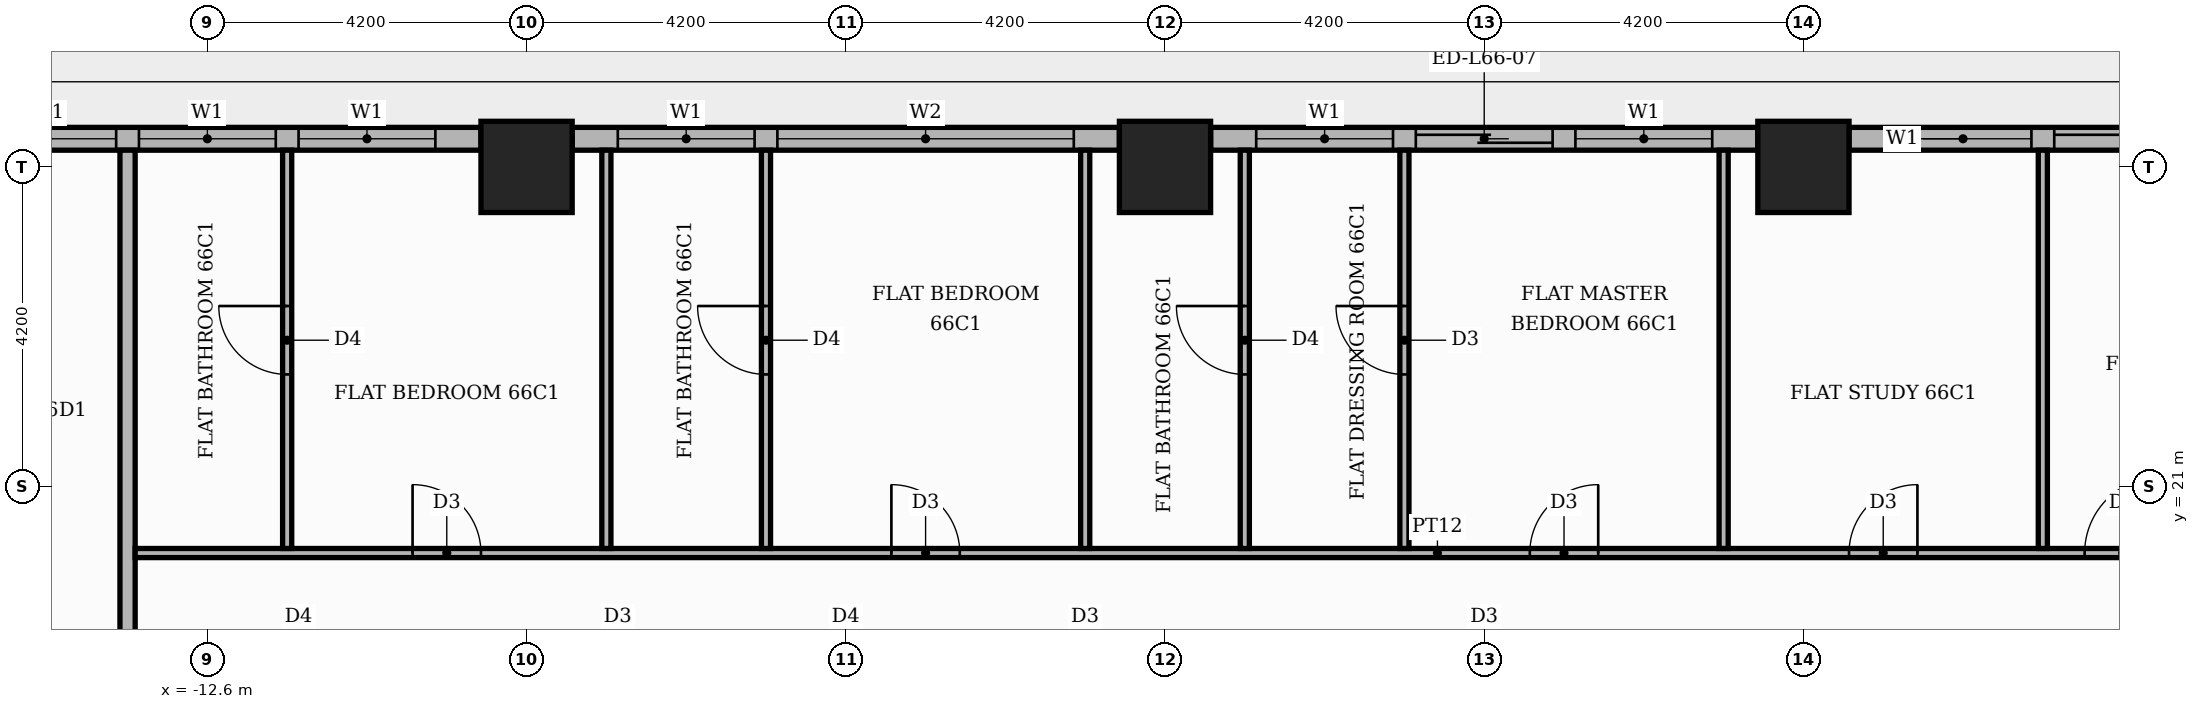
"""IFC4 building model, lengths in metres.
Left out: names, types, materials, properties, quantities, classifications, styles, units other than length and angle.
Written with IfcOpenShell. Run it as: python <this file> out.ifc"""

import sys

from ifc_helpers import new_model, si_unit, direction, frame, frame_2d, origin, origin_2d, place, context, subcontext, project, spatial, rectangle, extrude, element, fill, save


model = new_model("IFC4")
c1 = context("Model", 3, precision=1e-05, world=origin(), true_north=direction((0.0, 1.0)))
c2 = subcontext(c1, "Body", "Model", "MODEL_VIEW")
j1 = project(units=[si_unit("LENGTHUNIT", "METRE"), si_unit("PLANEANGLEUNIT", "RADIAN")], contexts=[c1])
p1 = place(None, origin())
s1 = spatial("IfcSite", under=j1, at=p1, CompositionType="ELEMENT")
p2 = place(p1, origin())
s2 = spatial("IfcBuilding", under=s1, at=p2, CompositionType="ELEMENT")
p3 = place(p2, frame((0.0, 0.0, 275.7)))
s3 = spatial("IfcBuildingStorey", under=s2, at=p3, CompositionType="ELEMENT", Elevation=275.7)
for number, where, z_axis, x_axis in (
    (1, (0.0, 25.2, 0.0), (0.0, 0.0, 1.0), (1.0, 0.0, 0.0)),
    (2, (-8.4, 25.2, 0.0), (0.0, 0.0, 1.0), (1.0, 0.0, 0.0)),
    (3, (8.4, 25.2, 0.0), (0.0, 0.0, 1.0), (1.0, 0.0, 0.0)),
):
    element("IfcColumn", number, at=place(p3, frame(where, z_axis=z_axis, x_axis=x_axis)), inside=s3, PredefinedType="COLUMN", context=c2, shape_type="SweptSolid", body=[
        extrude(rectangle(XDim=1.2, YDim=1.2, at=origin_2d()), origin(), (0.0, 0.0, 1.0), 3.9),
    ])
p4 = place(p3, frame((16.2, 25.57, 0.0), z_axis=(0.0, 0.0, 1.0), x_axis=(-1.0, 0.0, 0.0)))
e4 = element("IfcWall", 4, at=p4, inside=s3, PredefinedType="STANDARD", context=c2, shape_type="SweptSolid", body=[
    extrude(rectangle(XDim=7.2, YDim=0.3, at=frame_2d((3.6, 0.0))), origin(), (0.0, 0.0, 1.0), 3.48),
])
p5 = place(p4, frame((0.6, 0.0, 0.0)))
e5 = element("IfcOpeningElement", 5, at=p5, cuts=e4, PredefinedType="OPENING", context=c2, shape_type="SweptSolid", body=[
    extrude(rectangle(XDim=3.9, YDim=2.4, at=frame_2d((1.95, 1.2))), frame((0.0, 0.16, 0.0), z_axis=(0.0, -1.0, 0.0), x_axis=(1.0, 0.0, 0.0)), (0.0, 0.0, 1.0), 0.32),
])
p6 = place(p4, frame((4.8, 0.0, 0.9)))
e6 = element("IfcOpeningElement", 6, at=p6, cuts=e4, PredefinedType="OPENING", context=c2, shape_type="SweptSolid", body=[
    extrude(rectangle(XDim=1.8, YDim=2.1, at=frame_2d((0.9, 1.05))), frame((0.0, 0.16, 0.0), z_axis=(0.0, -1.0, 0.0), x_axis=(1.0, 0.0, 0.0)), (0.0, 0.0, 1.0), 0.32),
])
p7 = place(p3, frame((7.8, 25.57, 0.0), z_axis=(0.0, 0.0, 1.0), x_axis=(-1.0, 0.0, 0.0)))
e7 = element("IfcWall", 7, at=p7, inside=s3, PredefinedType="STANDARD", context=c2, shape_type="SweptSolid", body=[
    extrude(rectangle(XDim=7.2, YDim=0.3, at=frame_2d((3.6, 0.0))), origin(), (0.0, 0.0, 1.0), 3.48),
])
p8 = place(p7, frame((0.6, 0.0, 0.9)))
e8 = element("IfcOpeningElement", 8, at=p8, cuts=e7, PredefinedType="OPENING", context=c2, shape_type="SweptSolid", body=[
    extrude(rectangle(XDim=1.8, YDim=2.1, at=frame_2d((0.9, 1.05))), frame((0.0, 0.16, 0.0), z_axis=(0.0, -1.0, 0.0), x_axis=(1.0, 0.0, 0.0)), (0.0, 0.0, 1.0), 0.32),
])
p9 = place(p7, frame((2.7, 0.0, 0.0)))
e9 = element("IfcOpeningElement", 9, at=p9, cuts=e7, PredefinedType="OPENING", context=c2, shape_type="SweptSolid", body=[
    extrude(rectangle(XDim=1.8, YDim=2.4, at=frame_2d((0.9, 1.2))), frame((0.0, 0.16, 0.0), z_axis=(0.0, -1.0, 0.0), x_axis=(1.0, 0.0, 0.0)), (0.0, 0.0, 1.0), 0.32),
])
p10 = place(p7, frame((4.8, 0.0, 0.9)))
e10 = element("IfcOpeningElement", 10, at=p10, cuts=e7, PredefinedType="OPENING", context=c2, shape_type="SweptSolid", body=[
    extrude(rectangle(XDim=1.8, YDim=2.1, at=frame_2d((0.9, 1.05))), frame((0.0, 0.16, 0.0), z_axis=(0.0, -1.0, 0.0), x_axis=(1.0, 0.0, 0.0)), (0.0, 0.0, 1.0), 0.32),
])
p11 = place(p3, frame((-0.6, 25.57, 0.0), z_axis=(0.0, 0.0, 1.0), x_axis=(-1.0, 0.0, 0.0)))
e11 = element("IfcWall", 11, at=p11, inside=s3, PredefinedType="STANDARD", context=c2, shape_type="SweptSolid", body=[
    extrude(rectangle(XDim=7.2, YDim=0.3, at=frame_2d((3.6, 0.0))), origin(), (0.0, 0.0, 1.0), 3.48),
])
p12 = place(p11, frame((0.6, 0.0, 0.9)))
e12 = element("IfcOpeningElement", 12, at=p12, cuts=e11, PredefinedType="OPENING", context=c2, shape_type="SweptSolid", body=[
    extrude(rectangle(XDim=3.9, YDim=2.1, at=frame_2d((1.95, 1.05))), frame((0.0, 0.16, 0.0), z_axis=(0.0, -1.0, 0.0), x_axis=(1.0, 0.0, 0.0)), (0.0, 0.0, 1.0), 0.32),
])
p13 = place(p11, frame((4.8, 0.0, 0.9)))
e13 = element("IfcOpeningElement", 13, at=p13, cuts=e11, PredefinedType="OPENING", context=c2, shape_type="SweptSolid", body=[
    extrude(rectangle(XDim=1.8, YDim=2.1, at=frame_2d((0.9, 1.05))), frame((0.0, 0.16, 0.0), z_axis=(0.0, -1.0, 0.0), x_axis=(1.0, 0.0, 0.0)), (0.0, 0.0, 1.0), 0.32),
])
p14 = place(p3, frame((-9.0, 25.57, 0.0), z_axis=(0.0, 0.0, 1.0), x_axis=(-1.0, 0.0, 0.0)))
e14 = element("IfcWall", 14, at=p14, inside=s3, PredefinedType="STANDARD", context=c2, shape_type="SweptSolid", body=[
    extrude(rectangle(XDim=7.2, YDim=0.3, at=frame_2d((3.6, 0.0))), origin(), (0.0, 0.0, 1.0), 3.48),
])
p15 = place(p14, frame((0.6, 0.0, 0.9)))
e15 = element("IfcOpeningElement", 15, at=p15, cuts=e14, PredefinedType="OPENING", context=c2, shape_type="SweptSolid", body=[
    extrude(rectangle(XDim=1.8, YDim=2.1, at=frame_2d((0.9, 1.05))), frame((0.0, 0.16, 0.0), z_axis=(0.0, -1.0, 0.0), x_axis=(1.0, 0.0, 0.0)), (0.0, 0.0, 1.0), 0.32),
])
p16 = place(p14, frame((2.7, 0.0, 0.9)))
e16 = element("IfcOpeningElement", 16, at=p16, cuts=e14, PredefinedType="OPENING", context=c2, shape_type="SweptSolid", body=[
    extrude(rectangle(XDim=1.8, YDim=2.1, at=frame_2d((0.9, 1.05))), frame((0.0, 0.16, 0.0), z_axis=(0.0, -1.0, 0.0), x_axis=(1.0, 0.0, 0.0)), (0.0, 0.0, 1.0), 0.32),
])
p17 = place(p14, frame((4.8, 0.0, 0.9)))
e17 = element("IfcOpeningElement", 17, at=p17, cuts=e14, PredefinedType="OPENING", context=c2, shape_type="SweptSolid", body=[
    extrude(rectangle(XDim=1.8, YDim=2.1, at=frame_2d((0.9, 1.05))), frame((0.0, 0.16, 0.0), z_axis=(0.0, -1.0, 0.0), x_axis=(1.0, 0.0, 0.0)), (0.0, 0.0, 1.0), 0.32),
])
p18 = place(p3, frame((-13.65, 13.75, 0.0), z_axis=(0.0, 0.0, 1.0), x_axis=(0.0, 1.0, 0.0)))
e18 = element("IfcWall", 18, at=p18, inside=s3, PredefinedType="PARTITIONING", context=c2, shape_type="SweptSolid", body=[
    extrude(rectangle(XDim=11.67, YDim=0.2, at=frame_2d((5.835, 0.0))), origin(), (0.0, 0.0, 1.0), 3.48),
])
p19 = place(p3, frame((-13.55, 20.12, 0.0), z_axis=(0.0, 0.0, 1.0), x_axis=(1.0, 0.0, 0.0)))
e19 = element("IfcWall", 19, at=p19, inside=s3, PredefinedType="PARTITIONING", context=c2, shape_type="SweptSolid", body=[
    extrude(rectangle(XDim=34.269, YDim=0.12, at=frame_2d((17.135, 0.0))), origin(), (0.0, 0.0, 1.0), 3.48),
])
p20 = place(p19, frame((25.65, 0.0, 0.0)))
e20 = element("IfcOpeningElement", 20, at=p20, cuts=e19, PredefinedType="OPENING", context=c2, shape_type="SweptSolid", body=[
    extrude(rectangle(XDim=1.0, YDim=2.1, at=frame_2d((0.5, 1.05))), frame((0.0, 0.07, 0.0), z_axis=(0.0, -1.0, 0.0), x_axis=(1.0, 0.0, 0.0)), (0.0, 0.0, 1.0), 0.14),
])
p21 = place(p19, frame((22.55, 0.0, 0.0)))
e21 = element("IfcOpeningElement", 21, at=p21, cuts=e19, PredefinedType="OPENING", context=c2, shape_type="SweptSolid", body=[
    extrude(rectangle(XDim=0.9, YDim=2.1, at=frame_2d((0.45, 1.05))), frame((0.0, 0.07, 0.0), z_axis=(0.0, -1.0, 0.0), x_axis=(1.0, 0.0, 0.0)), (0.0, 0.0, 1.0), 0.14),
])
p22 = place(p19, frame((18.35, 0.0, 0.0)))
e22 = element("IfcOpeningElement", 22, at=p22, cuts=e19, PredefinedType="OPENING", context=c2, shape_type="SweptSolid", body=[
    extrude(rectangle(XDim=0.9, YDim=2.1, at=frame_2d((0.45, 1.05))), frame((0.0, 0.07, 0.0), z_axis=(0.0, -1.0, 0.0), x_axis=(1.0, 0.0, 0.0)), (0.0, 0.0, 1.0), 0.14),
])
p23 = place(p19, frame((9.95, 0.0, 0.0)))
e23 = element("IfcOpeningElement", 23, at=p23, cuts=e19, PredefinedType="OPENING", context=c2, shape_type="SweptSolid", body=[
    extrude(rectangle(XDim=0.9, YDim=2.1, at=frame_2d((0.45, 1.05))), frame((0.0, 0.07, 0.0), z_axis=(0.0, -1.0, 0.0), x_axis=(1.0, 0.0, 0.0)), (0.0, 0.0, 1.0), 0.14),
])
p24 = place(p19, frame((3.65, 0.0, 0.0)))
e24 = element("IfcOpeningElement", 24, at=p24, cuts=e19, PredefinedType="OPENING", context=c2, shape_type="SweptSolid", body=[
    extrude(rectangle(XDim=0.9, YDim=2.1, at=frame_2d((0.45, 1.05))), frame((0.0, 0.07, 0.0), z_axis=(0.0, -1.0, 0.0), x_axis=(1.0, 0.0, 0.0)), (0.0, 0.0, 1.0), 0.14),
])
p25 = place(p3, frame((-11.55, 20.18, 0.0), z_axis=(0.0, 0.0, 1.0), x_axis=(0.0, 1.0, 0.0)))
e25 = element("IfcWall", 25, at=p25, inside=s3, PredefinedType="PARTITIONING", context=c2, shape_type="SweptSolid", body=[
    extrude(rectangle(XDim=5.24, YDim=0.12, at=frame_2d((2.62, 0.0))), origin(), (0.0, 0.0, 1.0), 3.48),
])
p26 = place(p25, frame((2.29, 0.0, 0.0)))
e26 = element("IfcOpeningElement", 26, at=p26, cuts=e25, PredefinedType="OPENING", context=c2, shape_type="SweptSolid", body=[
    extrude(rectangle(XDim=0.9, YDim=2.1, at=frame_2d((0.45, 1.05))), frame((0.0, 0.07, 0.0), z_axis=(0.0, -1.0, 0.0), x_axis=(1.0, 0.0, 0.0)), (0.0, 0.0, 1.0), 0.14),
])
p27 = place(p3, frame((-7.35, 20.18, 0.0), z_axis=(0.0, 0.0, 1.0), x_axis=(0.0, 1.0, 0.0)))
e27 = element("IfcWall", 27, at=p27, inside=s3, PredefinedType="PARTITIONING", context=c2, shape_type="SweptSolid", body=[
    extrude(rectangle(XDim=5.24, YDim=0.12, at=frame_2d((2.62, 0.0))), origin(), (0.0, 0.0, 1.0), 3.48),
])
p28 = place(p3, frame((-5.25, 20.18, 0.0), z_axis=(0.0, 0.0, 1.0), x_axis=(0.0, 1.0, 0.0)))
e28 = element("IfcWall", 28, at=p28, inside=s3, PredefinedType="PARTITIONING", context=c2, shape_type="SweptSolid", body=[
    extrude(rectangle(XDim=5.24, YDim=0.12, at=frame_2d((2.62, 0.0))), origin(), (0.0, 0.0, 1.0), 3.48),
])
p29 = place(p28, frame((2.29, 0.0, 0.0)))
e29 = element("IfcOpeningElement", 29, at=p29, cuts=e28, PredefinedType="OPENING", context=c2, shape_type="SweptSolid", body=[
    extrude(rectangle(XDim=0.9, YDim=2.1, at=frame_2d((0.45, 1.05))), frame((0.0, 0.07, 0.0), z_axis=(0.0, -1.0, 0.0), x_axis=(1.0, 0.0, 0.0)), (0.0, 0.0, 1.0), 0.14),
])
p30 = place(p3, frame((-1.05, 20.18, 0.0), z_axis=(0.0, 0.0, 1.0), x_axis=(0.0, 1.0, 0.0)))
e30 = element("IfcWall", 30, at=p30, inside=s3, PredefinedType="PARTITIONING", context=c2, shape_type="SweptSolid", body=[
    extrude(rectangle(XDim=5.24, YDim=0.12, at=frame_2d((2.62, 0.0))), origin(), (0.0, 0.0, 1.0), 3.48),
])
p31 = place(p3, frame((1.05, 20.18, 0.0), z_axis=(0.0, 0.0, 1.0), x_axis=(0.0, 1.0, 0.0)))
e31 = element("IfcWall", 31, at=p31, inside=s3, PredefinedType="PARTITIONING", context=c2, shape_type="SweptSolid", body=[
    extrude(rectangle(XDim=5.24, YDim=0.12, at=frame_2d((2.62, 0.0))), origin(), (0.0, 0.0, 1.0), 3.48),
])
p32 = place(p31, frame((2.29, 0.0, 0.0)))
e32 = element("IfcOpeningElement", 32, at=p32, cuts=e31, PredefinedType="OPENING", context=c2, shape_type="SweptSolid", body=[
    extrude(rectangle(XDim=0.9, YDim=2.1, at=frame_2d((0.45, 1.05))), frame((0.0, 0.07, 0.0), z_axis=(0.0, -1.0, 0.0), x_axis=(1.0, 0.0, 0.0)), (0.0, 0.0, 1.0), 0.14),
])
p33 = place(p3, frame((3.15, 20.18, 0.0), z_axis=(0.0, 0.0, 1.0), x_axis=(0.0, 1.0, 0.0)))
e33 = element("IfcWall", 33, at=p33, inside=s3, PredefinedType="PARTITIONING", context=c2, shape_type="SweptSolid", body=[
    extrude(rectangle(XDim=5.24, YDim=0.12, at=frame_2d((2.62, 0.0))), origin(), (0.0, 0.0, 1.0), 3.48),
])
p34 = place(p33, frame((2.29, 0.0, 0.0)))
e34 = element("IfcOpeningElement", 34, at=p34, cuts=e33, PredefinedType="OPENING", context=c2, shape_type="SweptSolid", body=[
    extrude(rectangle(XDim=0.9, YDim=2.1, at=frame_2d((0.45, 1.05))), frame((0.0, 0.07, 0.0), z_axis=(0.0, -1.0, 0.0), x_axis=(1.0, 0.0, 0.0)), (0.0, 0.0, 1.0), 0.14),
])
for number, where, z_axis, x_axis in (
    (35, (7.35, 20.18, 0.0), (0.0, 0.0, 1.0), (0.0, 1.0, 0.0)),
    (36, (11.55, 20.18, 0.0), (0.0, 0.0, 1.0), (0.0, 1.0, 0.0)),
):
    element("IfcWall", number, at=place(p3, frame(where, z_axis=z_axis, x_axis=x_axis)), inside=s3, PredefinedType="PARTITIONING", context=c2, shape_type="SweptSolid", body=[
        extrude(rectangle(XDim=5.24, YDim=0.12, at=frame_2d((2.62, 0.0))), origin(), (0.0, 0.0, 1.0), 3.48),
    ])
p35 = place(p5, origin())
e37 = element("IfcDoor", 37, at=p35, inside=s3, OperationType="SLIDING_TO_LEFT", PredefinedType="DOOR", context=c2, shape_type="SweptSolid", body=[
    extrude(rectangle(XDim=3.9, YDim=2.4, at=frame_2d((1.95, 1.2))), frame((0.0, 0.025, 0.0), z_axis=(0.0, -1.0, 0.0), x_axis=(1.0, 0.0, 0.0)), (0.0, 0.0, 1.0), 0.05),
])
fill(e5, e37)
p36 = place(p6, origin())
e38 = element("IfcWindow", 38, at=p36, inside=s3, PartitioningType="SINGLE_PANEL", PredefinedType="WINDOW", context=c2, shape_type="SweptSolid", body=[
    extrude(rectangle(XDim=1.8, YDim=2.1, at=frame_2d((0.9, 1.05))), frame((0.0, 0.03, 0.0), z_axis=(0.0, -1.0, 0.0), x_axis=(1.0, 0.0, 0.0)), (0.0, 0.0, 1.0), 0.06),
])
fill(e6, e38)
p37 = place(p8, origin())
e39 = element("IfcWindow", 39, at=p37, inside=s3, PartitioningType="SINGLE_PANEL", PredefinedType="WINDOW", context=c2, shape_type="SweptSolid", body=[
    extrude(rectangle(XDim=1.8, YDim=2.1, at=frame_2d((0.9, 1.05))), frame((0.0, 0.03, 0.0), z_axis=(0.0, -1.0, 0.0), x_axis=(1.0, 0.0, 0.0)), (0.0, 0.0, 1.0), 0.06),
])
fill(e8, e39)
p38 = place(p9, origin())
e40 = element("IfcDoor", 40, at=p38, inside=s3, OperationType="SLIDING_TO_LEFT", PredefinedType="DOOR", context=c2, shape_type="SweptSolid", body=[
    extrude(rectangle(XDim=1.8, YDim=2.4, at=frame_2d((0.9, 1.2))), frame((0.0, 0.025, 0.0), z_axis=(0.0, -1.0, 0.0), x_axis=(1.0, 0.0, 0.0)), (0.0, 0.0, 1.0), 0.05),
])
fill(e9, e40)
p39 = place(p10, origin())
e41 = element("IfcWindow", 41, at=p39, inside=s3, PartitioningType="SINGLE_PANEL", PredefinedType="WINDOW", context=c2, shape_type="SweptSolid", body=[
    extrude(rectangle(XDim=1.8, YDim=2.1, at=frame_2d((0.9, 1.05))), frame((0.0, 0.03, 0.0), z_axis=(0.0, -1.0, 0.0), x_axis=(1.0, 0.0, 0.0)), (0.0, 0.0, 1.0), 0.06),
])
fill(e10, e41)
p40 = place(p12, origin())
e42 = element("IfcWindow", 42, at=p40, inside=s3, PartitioningType="SINGLE_PANEL", PredefinedType="WINDOW", context=c2, shape_type="SweptSolid", body=[
    extrude(rectangle(XDim=3.9, YDim=2.1, at=frame_2d((1.95, 1.05))), frame((0.0, 0.03, 0.0), z_axis=(0.0, -1.0, 0.0), x_axis=(1.0, 0.0, 0.0)), (0.0, 0.0, 1.0), 0.06),
])
fill(e12, e42)
p41 = place(p13, origin())
e43 = element("IfcWindow", 43, at=p41, inside=s3, PartitioningType="SINGLE_PANEL", PredefinedType="WINDOW", context=c2, shape_type="SweptSolid", body=[
    extrude(rectangle(XDim=1.8, YDim=2.1, at=frame_2d((0.9, 1.05))), frame((0.0, 0.03, 0.0), z_axis=(0.0, -1.0, 0.0), x_axis=(1.0, 0.0, 0.0)), (0.0, 0.0, 1.0), 0.06),
])
fill(e13, e43)
p42 = place(p15, origin())
e44 = element("IfcWindow", 44, at=p42, inside=s3, PartitioningType="SINGLE_PANEL", PredefinedType="WINDOW", context=c2, shape_type="SweptSolid", body=[
    extrude(rectangle(XDim=1.8, YDim=2.1, at=frame_2d((0.9, 1.05))), frame((0.0, 0.03, 0.0), z_axis=(0.0, -1.0, 0.0), x_axis=(1.0, 0.0, 0.0)), (0.0, 0.0, 1.0), 0.06),
])
fill(e15, e44)
p43 = place(p16, origin())
e45 = element("IfcWindow", 45, at=p43, inside=s3, PartitioningType="SINGLE_PANEL", PredefinedType="WINDOW", context=c2, shape_type="SweptSolid", body=[
    extrude(rectangle(XDim=1.8, YDim=2.1, at=frame_2d((0.9, 1.05))), frame((0.0, 0.03, 0.0), z_axis=(0.0, -1.0, 0.0), x_axis=(1.0, 0.0, 0.0)), (0.0, 0.0, 1.0), 0.06),
])
fill(e16, e45)
p44 = place(p17, origin())
e46 = element("IfcWindow", 46, at=p44, inside=s3, PartitioningType="SINGLE_PANEL", PredefinedType="WINDOW", context=c2, shape_type="SweptSolid", body=[
    extrude(rectangle(XDim=1.8, YDim=2.1, at=frame_2d((0.9, 1.05))), frame((0.0, 0.03, 0.0), z_axis=(0.0, -1.0, 0.0), x_axis=(1.0, 0.0, 0.0)), (0.0, 0.0, 1.0), 0.06),
])
fill(e17, e46)
p45 = place(p20, origin())
e47 = element("IfcDoor", 47, at=p45, inside=s3, OperationType="SINGLE_SWING_RIGHT", PredefinedType="DOOR", context=c2, shape_type="SweptSolid", body=[
    extrude(rectangle(XDim=1.0, YDim=2.1, at=frame_2d((0.5, 1.05))), frame((0.0, 0.025, 0.0), z_axis=(0.0, -1.0, 0.0), x_axis=(1.0, 0.0, 0.0)), (0.0, 0.0, 1.0), 0.05),
])
fill(e20, e47)
p46 = place(p21, origin())
e48 = element("IfcDoor", 48, at=p46, inside=s3, OperationType="SINGLE_SWING_RIGHT", PredefinedType="DOOR", context=c2, shape_type="SweptSolid", body=[
    extrude(rectangle(XDim=0.9, YDim=2.1, at=frame_2d((0.45, 1.05))), frame((0.0, 0.025, 0.0), z_axis=(0.0, -1.0, 0.0), x_axis=(1.0, 0.0, 0.0)), (0.0, 0.0, 1.0), 0.05),
])
fill(e21, e48)
p47 = place(p22, origin())
e49 = element("IfcDoor", 49, at=p47, inside=s3, OperationType="SINGLE_SWING_RIGHT", PredefinedType="DOOR", context=c2, shape_type="SweptSolid", body=[
    extrude(rectangle(XDim=0.9, YDim=2.1, at=frame_2d((0.45, 1.05))), frame((0.0, 0.025, 0.0), z_axis=(0.0, -1.0, 0.0), x_axis=(1.0, 0.0, 0.0)), (0.0, 0.0, 1.0), 0.05),
])
fill(e22, e49)
p48 = place(p34, origin())
e50 = element("IfcDoor", 50, at=p48, inside=s3, OperationType="SINGLE_SWING_RIGHT", PredefinedType="DOOR", context=c2, shape_type="SweptSolid", body=[
    extrude(rectangle(XDim=0.9, YDim=2.1, at=frame_2d((0.45, 1.05))), frame((0.0, 0.025, 0.0), z_axis=(0.0, -1.0, 0.0), x_axis=(1.0, 0.0, 0.0)), (0.0, 0.0, 1.0), 0.05),
])
fill(e34, e50)
p49 = place(p32, origin())
e51 = element("IfcDoor", 51, at=p49, inside=s3, OperationType="SINGLE_SWING_RIGHT", PredefinedType="DOOR", context=c2, shape_type="SweptSolid", body=[
    extrude(rectangle(XDim=0.9, YDim=2.1, at=frame_2d((0.45, 1.05))), frame((0.0, 0.025, 0.0), z_axis=(0.0, -1.0, 0.0), x_axis=(1.0, 0.0, 0.0)), (0.0, 0.0, 1.0), 0.05),
])
fill(e32, e51)
p50 = place(p23, origin())
e52 = element("IfcDoor", 52, at=p50, inside=s3, OperationType="SINGLE_SWING_LEFT", PredefinedType="DOOR", context=c2, shape_type="SweptSolid", body=[
    extrude(rectangle(XDim=0.9, YDim=2.1, at=frame_2d((0.45, 1.05))), frame((0.0, 0.025, 0.0), z_axis=(0.0, -1.0, 0.0), x_axis=(1.0, 0.0, 0.0)), (0.0, 0.0, 1.0), 0.05),
])
fill(e23, e52)
p51 = place(p29, origin())
e53 = element("IfcDoor", 53, at=p51, inside=s3, OperationType="SINGLE_SWING_RIGHT", PredefinedType="DOOR", context=c2, shape_type="SweptSolid", body=[
    extrude(rectangle(XDim=0.9, YDim=2.1, at=frame_2d((0.45, 1.05))), frame((0.0, 0.025, 0.0), z_axis=(0.0, -1.0, 0.0), x_axis=(1.0, 0.0, 0.0)), (0.0, 0.0, 1.0), 0.05),
])
fill(e29, e53)
p52 = place(p24, origin())
e54 = element("IfcDoor", 54, at=p52, inside=s3, OperationType="SINGLE_SWING_LEFT", PredefinedType="DOOR", context=c2, shape_type="SweptSolid", body=[
    extrude(rectangle(XDim=0.9, YDim=2.1, at=frame_2d((0.45, 1.05))), frame((0.0, 0.025, 0.0), z_axis=(0.0, -1.0, 0.0), x_axis=(1.0, 0.0, 0.0)), (0.0, 0.0, 1.0), 0.05),
])
fill(e24, e54)
p53 = place(p26, origin())
e55 = element("IfcDoor", 55, at=p53, inside=s3, OperationType="SINGLE_SWING_RIGHT", PredefinedType="DOOR", context=c2, shape_type="SweptSolid", body=[
    extrude(rectangle(XDim=0.9, YDim=2.1, at=frame_2d((0.45, 1.05))), frame((0.0, 0.025, 0.0), z_axis=(0.0, -1.0, 0.0), x_axis=(1.0, 0.0, 0.0)), (0.0, 0.0, 1.0), 0.05),
])
fill(e26, e55)
save(model, sys.argv[1])
